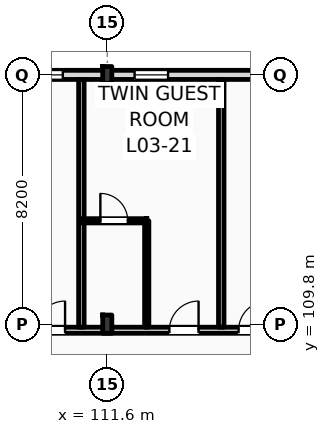
"""IFC4 building model, lengths in metres.
Left out: names, types, materials, properties, quantities, classifications, styles, units other than length and angle.
Written with IfcOpenShell. Run it as: python <this file> out.ifc"""

import sys

from ifc_helpers import new_model, si_unit, direction, frame, frame_2d, origin, origin_2d, place, context, subcontext, project, spatial, rectangle, i_section, extrude, element, fill, save


model = new_model("IFC4")
c1 = context("Model", 3, precision=1e-05, world=origin(), true_north=direction((0.0, 1.0)))
c2 = subcontext(c1, "Body", "Model", "MODEL_VIEW")
j1 = project(units=[si_unit("LENGTHUNIT", "METRE"), si_unit("PLANEANGLEUNIT", "RADIAN")], contexts=[c1])
p1 = place(None, origin())
s1 = spatial("IfcSite", under=j1, at=p1, CompositionType="ELEMENT")
p2 = place(p1, origin())
s2 = spatial("IfcBuilding", under=s1, at=p2, CompositionType="ELEMENT")
p3 = place(p2, frame((0.0, 0.0, 16.2)))
s3 = spatial("IfcBuildingStorey", under=s2, at=p3, CompositionType="ELEMENT", Elevation=16.2)
p4 = place(p3, frame((111.6, 109.8, 0.0), z_axis=(0.0, 0.0, 1.0), x_axis=(1.0, 0.0, 0.0)))
e1 = element("IfcColumn", 1, at=p4, inside=s3, PredefinedType="COLUMN", context=c2, shape_type="SweptSolid", body=[
    extrude(i_section(OverallWidth=0.3, OverallDepth=0.6, WebThickness=0.015, FlangeThickness=0.03, FilletRadius=0.027, at=origin_2d()), origin(), (0.0, 0.0, 1.0), 4.2),
])
p5 = place(p3, frame((111.6, 118.0, 0.0), z_axis=(0.0, 0.0, 1.0), x_axis=(1.0, 0.0, 0.0)))
e2 = element("IfcColumn", 2, at=p5, inside=s3, PredefinedType="COLUMN", context=c2, shape_type="SweptSolid", body=[
    extrude(i_section(OverallWidth=0.3, OverallDepth=0.55, WebThickness=0.015, FlangeThickness=0.029, FilletRadius=0.027, at=origin_2d()), origin(), (0.0, 0.0, 1.0), 4.2),
])
p6 = place(p3, frame((22.5, 118.0, 0.0), z_axis=(0.0, 0.0, 1.0), x_axis=(1.0, 0.0, 0.0)))
e3 = element("IfcWall", 3, at=p6, inside=s3, PredefinedType="STANDARD", context=c2, shape_type="SweptSolid", body=[
    extrude(rectangle(XDim=97.5, YDim=0.3, at=frame_2d((48.75, 0.0))), origin(), (0.0, 0.0, 1.0), 3.36),
])
p7 = place(p6, frame((3.721, 0.0, 0.9)))
e4 = element("IfcOpeningElement", 4, at=p7, cuts=e3, PredefinedType="OPENING", context=c2, shape_type="SweptSolid", body=[
    extrude(rectangle(XDim=0.9, YDim=1.8, at=frame_2d((0.45, 0.9))), frame((0.0, 0.16, 0.0), z_axis=(0.0, -1.0, 0.0), x_axis=(1.0, 0.0, 0.0)), (0.0, 0.0, 1.0), 0.32),
])
p8 = place(p6, frame((6.447, 0.0, 0.9)))
e5 = element("IfcOpeningElement", 5, at=p8, cuts=e3, PredefinedType="OPENING", context=c2, shape_type="SweptSolid", body=[
    extrude(rectangle(XDim=1.35, YDim=1.85, at=frame_2d((0.675, 0.925))), frame((0.0, 0.16, 0.0), z_axis=(0.0, -1.0, 0.0), x_axis=(1.0, 0.0, 0.0)), (0.0, 0.0, 1.0), 0.32),
])
p9 = place(p6, frame((11.363, 0.0, 0.9)))
e6 = element("IfcOpeningElement", 6, at=p9, cuts=e3, PredefinedType="OPENING", context=c2, shape_type="SweptSolid", body=[
    extrude(rectangle(XDim=1.5, YDim=1.9, at=frame_2d((0.75, 0.95))), frame((0.0, 0.16, 0.0), z_axis=(0.0, -1.0, 0.0), x_axis=(1.0, 0.0, 0.0)), (0.0, 0.0, 1.0), 0.32),
])
p10 = place(p6, frame((15.078, 0.0, 0.9)))
e7 = element("IfcOpeningElement", 7, at=p10, cuts=e3, PredefinedType="OPENING", context=c2, shape_type="SweptSolid", body=[
    extrude(rectangle(XDim=1.65, YDim=1.95, at=frame_2d((0.825, 0.975))), frame((0.0, 0.16, 0.0), z_axis=(0.0, -1.0, 0.0), x_axis=(1.0, 0.0, 0.0)), (0.0, 0.0, 1.0), 0.32),
])
p11 = place(p6, frame((19.395, 0.0, 0.9)))
e8 = element("IfcOpeningElement", 8, at=p11, cuts=e3, PredefinedType="OPENING", context=c2, shape_type="SweptSolid", body=[
    extrude(rectangle(XDim=1.8, YDim=2.0, at=frame_2d((0.9, 1.0))), frame((0.0, 0.16, 0.0), z_axis=(0.0, -1.0, 0.0), x_axis=(1.0, 0.0, 0.0)), (0.0, 0.0, 1.0), 0.32),
])
p12 = place(p6, frame((23.31, 0.0, 0.9)))
e9 = element("IfcOpeningElement", 9, at=p12, cuts=e3, PredefinedType="OPENING", context=c2, shape_type="SweptSolid", body=[
    extrude(rectangle(XDim=1.95, YDim=2.05, at=frame_2d((0.975, 1.025))), frame((0.0, 0.16, 0.0), z_axis=(0.0, -1.0, 0.0), x_axis=(1.0, 0.0, 0.0)), (0.0, 0.0, 1.0), 0.32),
])
p13 = place(p6, frame((28.026, 0.0, 0.9)))
e10 = element("IfcOpeningElement", 10, at=p13, cuts=e3, PredefinedType="OPENING", context=c2, shape_type="SweptSolid", body=[
    extrude(rectangle(XDim=2.1, YDim=2.1, at=frame_2d((1.05, 1.05))), frame((0.0, 0.16, 0.0), z_axis=(0.0, -1.0, 0.0), x_axis=(1.0, 0.0, 0.0)), (0.0, 0.0, 1.0), 0.32),
])
p14 = place(p6, frame((31.941, 0.0, 0.9)))
e11 = element("IfcOpeningElement", 11, at=p14, cuts=e3, PredefinedType="OPENING", context=c2, shape_type="SweptSolid", body=[
    extrude(rectangle(XDim=1.1, YDim=2.15, at=frame_2d((0.55, 1.075))), frame((0.0, 0.16, 0.0), z_axis=(0.0, -1.0, 0.0), x_axis=(1.0, 0.0, 0.0)), (0.0, 0.0, 1.0), 0.32),
])
p15 = place(p6, frame((36.657, 0.0, 0.9)))
e12 = element("IfcOpeningElement", 12, at=p15, cuts=e3, PredefinedType="OPENING", context=c2, shape_type="SweptSolid", body=[
    extrude(rectangle(XDim=2.4, YDim=2.2, at=frame_2d((1.2, 1.1))), frame((0.0, 0.16, 0.0), z_axis=(0.0, -1.0, 0.0), x_axis=(1.0, 0.0, 0.0)), (0.0, 0.0, 1.0), 0.32),
])
p16 = place(p6, frame((42.574, 0.0, 0.9)))
e13 = element("IfcOpeningElement", 13, at=p16, cuts=e3, PredefinedType="OPENING", context=c2, shape_type="SweptSolid", body=[
    extrude(rectangle(XDim=1.35, YDim=2.25, at=frame_2d((0.675, 1.125))), frame((0.0, 0.16, 0.0), z_axis=(0.0, -1.0, 0.0), x_axis=(1.0, 0.0, 0.0)), (0.0, 0.0, 1.0), 0.32),
])
p17 = place(p6, frame((45.289, 0.0, 0.9)))
e14 = element("IfcOpeningElement", 14, at=p17, cuts=e3, PredefinedType="OPENING", context=c2, shape_type="SweptSolid", body=[
    extrude(rectangle(XDim=2.7, YDim=2.28, at=frame_2d((1.35, 1.14))), frame((0.0, 0.16, 0.0), z_axis=(0.0, -1.0, 0.0), x_axis=(1.0, 0.0, 0.0)), (0.0, 0.0, 1.0), 0.32),
])
p18 = place(p6, frame((50.406, 0.0, 0.9)))
e15 = element("IfcOpeningElement", 15, at=p18, cuts=e3, PredefinedType="OPENING", context=c2, shape_type="SweptSolid", body=[
    extrude(rectangle(XDim=1.8, YDim=2.28, at=frame_2d((0.9, 1.14))), frame((0.0, 0.16, 0.0), z_axis=(0.0, -1.0, 0.0), x_axis=(1.0, 0.0, 0.0)), (0.0, 0.0, 1.0), 0.32),
])
p19 = place(p6, frame((53.922, 0.0, 0.9)))
e16 = element("IfcOpeningElement", 16, at=p19, cuts=e3, PredefinedType="OPENING", context=c2, shape_type="SweptSolid", body=[
    extrude(rectangle(XDim=1.8, YDim=2.28, at=frame_2d((0.9, 1.14))), frame((0.0, 0.16, 0.0), z_axis=(0.0, -1.0, 0.0), x_axis=(1.0, 0.0, 0.0)), (0.0, 0.0, 1.0), 0.32),
])
p20 = place(p6, frame((58.332, 0.0, 0.9)))
e17 = element("IfcOpeningElement", 17, at=p20, cuts=e3, PredefinedType="OPENING", context=c2, shape_type="SweptSolid", body=[
    extrude(rectangle(XDim=2.961, YDim=2.28, at=frame_2d((1.48, 1.14))), frame((0.0, 0.16, 0.0), z_axis=(0.0, -1.0, 0.0), x_axis=(1.0, 0.0, 0.0)), (0.0, 0.0, 1.0), 0.32),
])
p21 = place(p6, frame((62.513, 0.0, 0.9)))
e18 = element("IfcOpeningElement", 18, at=p21, cuts=e3, PredefinedType="OPENING", context=c2, shape_type="SweptSolid", body=[
    extrude(rectangle(XDim=1.8, YDim=2.28, at=frame_2d((0.9, 1.14))), frame((0.0, 0.16, 0.0), z_axis=(0.0, -1.0, 0.0), x_axis=(1.0, 0.0, 0.0)), (0.0, 0.0, 1.0), 0.32),
])
p22 = place(p6, frame((67.114, 0.0, 0.9)))
e19 = element("IfcOpeningElement", 19, at=p22, cuts=e3, PredefinedType="OPENING", context=c2, shape_type="SweptSolid", body=[
    extrude(rectangle(XDim=2.961, YDim=2.28, at=frame_2d((1.48, 1.14))), frame((0.0, 0.16, 0.0), z_axis=(0.0, -1.0, 0.0), x_axis=(1.0, 0.0, 0.0)), (0.0, 0.0, 1.0), 0.32),
])
p23 = place(p6, frame((73.695, 0.0, 0.9)))
e20 = element("IfcOpeningElement", 20, at=p23, cuts=e3, PredefinedType="OPENING", context=c2, shape_type="SweptSolid", body=[
    extrude(rectangle(XDim=1.1, YDim=2.28, at=frame_2d((0.55, 1.14))), frame((0.0, 0.16, 0.0), z_axis=(0.0, -1.0, 0.0), x_axis=(1.0, 0.0, 0.0)), (0.0, 0.0, 1.0), 0.32),
])
p24 = place(p6, frame((75.895, 0.0, 0.9)))
e21 = element("IfcOpeningElement", 21, at=p24, cuts=e3, PredefinedType="OPENING", context=c2, shape_type="SweptSolid", body=[
    extrude(rectangle(XDim=2.961, YDim=2.28, at=frame_2d((1.48, 1.14))), frame((0.0, 0.16, 0.0), z_axis=(0.0, -1.0, 0.0), x_axis=(1.0, 0.0, 0.0)), (0.0, 0.0, 1.0), 0.32),
])
p25 = place(p6, frame((81.676, 0.0, 0.9)))
e22 = element("IfcOpeningElement", 22, at=p25, cuts=e3, PredefinedType="OPENING", context=c2, shape_type="SweptSolid", body=[
    extrude(rectangle(XDim=1.8, YDim=2.28, at=frame_2d((0.9, 1.14))), frame((0.0, 0.16, 0.0), z_axis=(0.0, -1.0, 0.0), x_axis=(1.0, 0.0, 0.0)), (0.0, 0.0, 1.0), 0.32),
])
p26 = place(p6, frame((84.677, 0.0, 0.9)))
e23 = element("IfcOpeningElement", 23, at=p26, cuts=e3, PredefinedType="OPENING", context=c2, shape_type="SweptSolid", body=[
    extrude(rectangle(XDim=2.961, YDim=2.28, at=frame_2d((1.48, 1.14))), frame((0.0, 0.16, 0.0), z_axis=(0.0, -1.0, 0.0), x_axis=(1.0, 0.0, 0.0)), (0.0, 0.0, 1.0), 0.32),
])
p27 = place(p6, frame((89.999, 0.0, 0.9)))
e24 = element("IfcOpeningElement", 24, at=p27, cuts=e3, PredefinedType="OPENING", context=c2, shape_type="SweptSolid", body=[
    extrude(rectangle(XDim=1.1, YDim=1.5, at=frame_2d((0.55, 0.75))), frame((0.0, 0.16, 0.0), z_axis=(0.0, -1.0, 0.0), x_axis=(1.0, 0.0, 0.0)), (0.0, 0.0, 1.0), 0.32),
])
p28 = place(p6, frame((94.35, 0.0, 0.9)))
e25 = element("IfcOpeningElement", 25, at=p28, cuts=e3, PredefinedType="OPENING", context=c2, shape_type="SweptSolid", body=[
    extrude(rectangle(XDim=1.25, YDim=1.6, at=frame_2d((0.625, 0.8))), frame((0.0, 0.16, 0.0), z_axis=(0.0, -1.0, 0.0), x_axis=(1.0, 0.0, 0.0)), (0.0, 0.0, 1.0), 0.32),
])
p29 = place(p3, frame((10.65, 109.6, 0.0), z_axis=(0.0, 0.0, 1.0), x_axis=(1.0, 0.0, 0.0)))
e26 = element("IfcWall", 26, at=p29, inside=s3, PredefinedType="PARTITIONING", context=c2, shape_type="SweptSolid", body=[
    extrude(rectangle(XDim=109.21, YDim=0.2, at=frame_2d((54.605, 0.0))), origin(), (0.0, 0.0, 1.0), 3.36),
])
p30 = place(p29, frame((15.43, 0.0, 0.0)))
e27 = element("IfcOpeningElement", 27, at=p30, cuts=e26, PredefinedType="OPENING", context=c2, shape_type="SweptSolid", body=[
    extrude(rectangle(XDim=1.02, YDim=2.2, at=frame_2d((0.51, 1.1))), frame((0.0, 0.11, 0.0), z_axis=(0.0, -1.0, 0.0), x_axis=(1.0, 0.0, 0.0)), (0.0, 0.0, 1.0), 0.22),
])
p31 = place(p29, frame((19.537, 0.0, 0.0)))
e28 = element("IfcOpeningElement", 28, at=p31, cuts=e26, PredefinedType="OPENING", context=c2, shape_type="SweptSolid", body=[
    extrude(rectangle(XDim=1.02, YDim=2.2, at=frame_2d((0.51, 1.1))), frame((0.0, 0.11, 0.0), z_axis=(0.0, -1.0, 0.0), x_axis=(1.0, 0.0, 0.0)), (0.0, 0.0, 1.0), 0.22),
])
p32 = place(p29, frame((23.928, 0.0, 0.0)))
e29 = element("IfcOpeningElement", 29, at=p32, cuts=e26, PredefinedType="OPENING", context=c2, shape_type="SweptSolid", body=[
    extrude(rectangle(XDim=1.02, YDim=2.2, at=frame_2d((0.51, 1.1))), frame((0.0, 0.11, 0.0), z_axis=(0.0, -1.0, 0.0), x_axis=(1.0, 0.0, 0.0)), (0.0, 0.0, 1.0), 0.22),
])
p33 = place(p29, frame((26.169, 0.0, 0.0)))
e30 = element("IfcOpeningElement", 30, at=p33, cuts=e26, PredefinedType="OPENING", context=c2, shape_type="SweptSolid", body=[
    extrude(rectangle(XDim=1.02, YDim=2.2, at=frame_2d((0.51, 1.1))), frame((0.0, 0.11, 0.0), z_axis=(0.0, -1.0, 0.0), x_axis=(1.0, 0.0, 0.0)), (0.0, 0.0, 1.0), 0.22),
])
p34 = place(p29, frame((32.739, 0.0, 0.0)))
e31 = element("IfcOpeningElement", 31, at=p34, cuts=e26, PredefinedType="OPENING", context=c2, shape_type="SweptSolid", body=[
    extrude(rectangle(XDim=0.96, YDim=2.2, at=frame_2d((0.48, 1.1))), frame((0.0, 0.11, 0.0), z_axis=(0.0, -1.0, 0.0), x_axis=(1.0, 0.0, 0.0)), (0.0, 0.0, 1.0), 0.22),
])
p35 = place(p29, frame((34.98, 0.0, 0.0)))
e32 = element("IfcOpeningElement", 32, at=p35, cuts=e26, PredefinedType="OPENING", context=c2, shape_type="SweptSolid", body=[
    extrude(rectangle(XDim=0.96, YDim=2.2, at=frame_2d((0.48, 1.1))), frame((0.0, 0.11, 0.0), z_axis=(0.0, -1.0, 0.0), x_axis=(1.0, 0.0, 0.0)), (0.0, 0.0, 1.0), 0.22),
])
p36 = place(p29, frame((41.521, 0.0, 0.0)))
e33 = element("IfcOpeningElement", 33, at=p36, cuts=e26, PredefinedType="OPENING", context=c2, shape_type="SweptSolid", body=[
    extrude(rectangle(XDim=0.96, YDim=2.2, at=frame_2d((0.48, 1.1))), frame((0.0, 0.11, 0.0), z_axis=(0.0, -1.0, 0.0), x_axis=(1.0, 0.0, 0.0)), (0.0, 0.0, 1.0), 0.22),
])
p37 = place(p29, frame((43.512, 0.0, 0.0)))
e34 = element("IfcOpeningElement", 34, at=p37, cuts=e26, PredefinedType="OPENING", context=c2, shape_type="SweptSolid", body=[
    extrude(rectangle(XDim=0.96, YDim=2.2, at=frame_2d((0.48, 1.1))), frame((0.0, 0.11, 0.0), z_axis=(0.0, -1.0, 0.0), x_axis=(1.0, 0.0, 0.0)), (0.0, 0.0, 1.0), 0.22),
])
p38 = place(p29, frame((50.303, 0.0, 0.0)))
e35 = element("IfcOpeningElement", 35, at=p38, cuts=e26, PredefinedType="OPENING", context=c2, shape_type="SweptSolid", body=[
    extrude(rectangle(XDim=0.96, YDim=2.2, at=frame_2d((0.48, 1.1))), frame((0.0, 0.11, 0.0), z_axis=(0.0, -1.0, 0.0), x_axis=(1.0, 0.0, 0.0)), (0.0, 0.0, 1.0), 0.22),
])
p39 = place(p29, frame((54.944, 0.0, 0.0)))
e36 = element("IfcOpeningElement", 36, at=p39, cuts=e26, PredefinedType="OPENING", context=c2, shape_type="SweptSolid", body=[
    extrude(rectangle(XDim=0.96, YDim=2.2, at=frame_2d((0.48, 1.1))), frame((0.0, 0.11, 0.0), z_axis=(0.0, -1.0, 0.0), x_axis=(1.0, 0.0, 0.0)), (0.0, 0.0, 1.0), 0.22),
])
p40 = place(p29, frame((59.085, 0.0, 0.0)))
e37 = element("IfcOpeningElement", 37, at=p40, cuts=e26, PredefinedType="OPENING", context=c2, shape_type="SweptSolid", body=[
    extrude(rectangle(XDim=0.96, YDim=2.2, at=frame_2d((0.48, 1.1))), frame((0.0, 0.11, 0.0), z_axis=(0.0, -1.0, 0.0), x_axis=(1.0, 0.0, 0.0)), (0.0, 0.0, 1.0), 0.22),
])
p41 = place(p29, frame((63.476, 0.0, 0.0)))
e38 = element("IfcOpeningElement", 38, at=p41, cuts=e26, PredefinedType="OPENING", context=c2, shape_type="SweptSolid", body=[
    extrude(rectangle(XDim=0.96, YDim=2.2, at=frame_2d((0.48, 1.1))), frame((0.0, 0.11, 0.0), z_axis=(0.0, -1.0, 0.0), x_axis=(1.0, 0.0, 0.0)), (0.0, 0.0, 1.0), 0.22),
])
p42 = place(p29, frame((65.716, 0.0, 0.0)))
e39 = element("IfcOpeningElement", 39, at=p42, cuts=e26, PredefinedType="OPENING", context=c2, shape_type="SweptSolid", body=[
    extrude(rectangle(XDim=0.96, YDim=2.2, at=frame_2d((0.48, 1.1))), frame((0.0, 0.11, 0.0), z_axis=(0.0, -1.0, 0.0), x_axis=(1.0, 0.0, 0.0)), (0.0, 0.0, 1.0), 0.22),
])
p43 = place(p29, frame((72.257, 0.0, 0.0)))
e40 = element("IfcOpeningElement", 40, at=p43, cuts=e26, PredefinedType="OPENING", context=c2, shape_type="SweptSolid", body=[
    extrude(rectangle(XDim=0.96, YDim=2.2, at=frame_2d((0.48, 1.1))), frame((0.0, 0.11, 0.0), z_axis=(0.0, -1.0, 0.0), x_axis=(1.0, 0.0, 0.0)), (0.0, 0.0, 1.0), 0.22),
])
p44 = place(p29, frame((74.498, 0.0, 0.0)))
e41 = element("IfcOpeningElement", 41, at=p44, cuts=e26, PredefinedType="OPENING", context=c2, shape_type="SweptSolid", body=[
    extrude(rectangle(XDim=0.96, YDim=2.2, at=frame_2d((0.48, 1.1))), frame((0.0, 0.11, 0.0), z_axis=(0.0, -1.0, 0.0), x_axis=(1.0, 0.0, 0.0)), (0.0, 0.0, 1.0), 0.22),
])
p45 = place(p29, frame((81.039, 0.0, 0.0)))
e42 = element("IfcOpeningElement", 42, at=p45, cuts=e26, PredefinedType="OPENING", context=c2, shape_type="SweptSolid", body=[
    extrude(rectangle(XDim=0.96, YDim=2.2, at=frame_2d((0.48, 1.1))), frame((0.0, 0.11, 0.0), z_axis=(0.0, -1.0, 0.0), x_axis=(1.0, 0.0, 0.0)), (0.0, 0.0, 1.0), 0.22),
])
p46 = place(p29, frame((85.68, 0.0, 0.0)))
e43 = element("IfcOpeningElement", 43, at=p46, cuts=e26, PredefinedType="OPENING", context=c2, shape_type="SweptSolid", body=[
    extrude(rectangle(XDim=0.96, YDim=2.2, at=frame_2d((0.48, 1.1))), frame((0.0, 0.11, 0.0), z_axis=(0.0, -1.0, 0.0), x_axis=(1.0, 0.0, 0.0)), (0.0, 0.0, 1.0), 0.22),
])
p47 = place(p29, frame((89.82, 0.0, 0.0)))
e44 = element("IfcOpeningElement", 44, at=p47, cuts=e26, PredefinedType="OPENING", context=c2, shape_type="SweptSolid", body=[
    extrude(rectangle(XDim=0.96, YDim=2.2, at=frame_2d((0.48, 1.1))), frame((0.0, 0.11, 0.0), z_axis=(0.0, -1.0, 0.0), x_axis=(1.0, 0.0, 0.0)), (0.0, 0.0, 1.0), 0.22),
])
p48 = place(p29, frame((94.211, 0.0, 0.0)))
e45 = element("IfcOpeningElement", 45, at=p48, cuts=e26, PredefinedType="OPENING", context=c2, shape_type="SweptSolid", body=[
    extrude(rectangle(XDim=0.96, YDim=2.2, at=frame_2d((0.48, 1.1))), frame((0.0, 0.11, 0.0), z_axis=(0.0, -1.0, 0.0), x_axis=(1.0, 0.0, 0.0)), (0.0, 0.0, 1.0), 0.22),
])
p49 = place(p29, frame((98.602, 0.0, 0.0)))
e46 = element("IfcOpeningElement", 46, at=p49, cuts=e26, PredefinedType="OPENING", context=c2, shape_type="SweptSolid", body=[
    extrude(rectangle(XDim=0.96, YDim=2.2, at=frame_2d((0.48, 1.1))), frame((0.0, 0.11, 0.0), z_axis=(0.0, -1.0, 0.0), x_axis=(1.0, 0.0, 0.0)), (0.0, 0.0, 1.0), 0.22),
])
p50 = place(p29, frame((102.993, 0.0, 0.0)))
e47 = element("IfcOpeningElement", 47, at=p50, cuts=e26, PredefinedType="OPENING", context=c2, shape_type="SweptSolid", body=[
    extrude(rectangle(XDim=0.96, YDim=2.2, at=frame_2d((0.48, 1.1))), frame((0.0, 0.11, 0.0), z_axis=(0.0, -1.0, 0.0), x_axis=(1.0, 0.0, 0.0)), (0.0, 0.0, 1.0), 0.22),
])
p51 = place(p29, frame((105.269, 0.0, 0.0)))
e48 = element("IfcOpeningElement", 48, at=p51, cuts=e26, PredefinedType="OPENING", context=c2, shape_type="SweptSolid", body=[
    extrude(rectangle(XDim=0.96, YDim=2.2, at=frame_2d((0.48, 1.1))), frame((0.0, 0.11, 0.0), z_axis=(0.0, -1.0, 0.0), x_axis=(1.0, 0.0, 0.0)), (0.0, 0.0, 1.0), 0.22),
])
p52 = place(p29, frame((2.716, 0.0, 0.0)))
e49 = element("IfcOpeningElement", 49, at=p52, cuts=e26, PredefinedType="OPENING", context=c2, shape_type="SweptSolid", body=[
    extrude(rectangle(XDim=1.35, YDim=2.25, at=frame_2d((0.675, 1.125))), frame((0.0, 0.11, 0.0), z_axis=(0.0, -1.0, 0.0), x_axis=(1.0, 0.0, 0.0)), (0.0, 0.0, 1.0), 0.22),
])
p53 = place(p29, frame((6.65, 0.0, 0.0)))
e50 = element("IfcOpeningElement", 50, at=p53, cuts=e26, PredefinedType="OPENING", context=c2, shape_type="SweptSolid", body=[
    extrude(rectangle(XDim=1.35, YDim=2.25, at=frame_2d((0.675, 1.125))), frame((0.0, 0.11, 0.0), z_axis=(0.0, -1.0, 0.0), x_axis=(1.0, 0.0, 0.0)), (0.0, 0.0, 1.0), 0.22),
])
p54 = place(p29, frame((10.583, 0.0, 0.0)))
e51 = element("IfcOpeningElement", 51, at=p54, cuts=e26, PredefinedType="OPENING", context=c2, shape_type="SweptSolid", body=[
    extrude(rectangle(XDim=1.35, YDim=2.25, at=frame_2d((0.675, 1.125))), frame((0.0, 0.11, 0.0), z_axis=(0.0, -1.0, 0.0), x_axis=(1.0, 0.0, 0.0)), (0.0, 0.0, 1.0), 0.22),
])
for number, where, z_axis, x_axis in (
    (52, (110.748, 109.7, 0.0), (0.0, 0.0, 1.0), (0.0, 1.0, 0.0)),
    (53, (115.349, 109.7, 0.0), (0.0, 0.0, 1.0), (0.0, 1.0, 0.0)),
):
    element("IfcWall", number, at=place(p3, frame(where, z_axis=z_axis, x_axis=x_axis)), inside=s3, PredefinedType="PARTITIONING", context=c2, shape_type="SweptSolid", body=[
        extrude(rectangle(XDim=8.15, YDim=0.18, at=frame_2d((4.075, 0.0))), origin(), (0.0, 0.0, 1.0), 3.92),
    ])
p55 = place(p3, frame((112.898, 109.7, 0.0), z_axis=(0.0, 0.0, 1.0), x_axis=(0.0, 1.0, 0.0)))
e54 = element("IfcWall", 54, at=p55, inside=s3, PredefinedType="PARTITIONING", context=c2, shape_type="SweptSolid", body=[
    extrude(rectangle(XDim=3.5, YDim=0.14, at=frame_2d((1.75, 0.0))), origin(), (0.0, 0.0, 1.0), 3.92),
])
p56 = place(p3, frame((110.748, 113.2, 0.0), z_axis=(0.0, 0.0, 1.0), x_axis=(1.0, 0.0, 0.0)))
e55 = element("IfcWall", 55, at=p56, inside=s3, PredefinedType="PARTITIONING", context=c2, shape_type="SweptSolid", body=[
    extrude(rectangle(XDim=2.15, YDim=0.14, at=frame_2d((1.075, 0.0))), origin(), (0.0, 0.0, 1.0), 3.92),
])
p57 = place(p56, frame((0.625, 0.0, 0.0)))
e56 = element("IfcOpeningElement", 56, at=p57, cuts=e55, PredefinedType="OPENING", context=c2, shape_type="SweptSolid", body=[
    extrude(rectangle(XDim=0.9, YDim=2.1, at=frame_2d((0.45, 1.05))), frame((0.0, 0.08, 0.0), z_axis=(0.0, -1.0, 0.0), x_axis=(1.0, 0.0, 0.0)), (0.0, 0.0, 1.0), 0.16),
])
p58 = place(p26, origin())
e57 = element("IfcWindow", 57, at=p58, inside=s3, PartitioningType="DOUBLE_PANEL_VERTICAL", PredefinedType="WINDOW", context=c2, shape_type="SweptSolid", body=[
    extrude(rectangle(XDim=2.961, YDim=2.28, at=frame_2d((1.48, 1.14))), frame((0.0, 0.03, 0.0), z_axis=(0.0, -1.0, 0.0), x_axis=(1.0, 0.0, 0.0)), (0.0, 0.0, 1.0), 0.06),
])
fill(e23, e57)
p59 = place(p27, origin())
e58 = element("IfcWindow", 58, at=p59, inside=s3, PartitioningType="DOUBLE_PANEL_VERTICAL", PredefinedType="WINDOW", context=c2, shape_type="SweptSolid", body=[
    extrude(rectangle(XDim=1.1, YDim=1.5, at=frame_2d((0.55, 0.75))), frame((0.0, 0.03, 0.0), z_axis=(0.0, -1.0, 0.0), x_axis=(1.0, 0.0, 0.0)), (0.0, 0.0, 1.0), 0.06),
])
fill(e24, e58)
p60 = place(p49, origin())
e59 = element("IfcDoor", 59, at=p60, inside=s3, OperationType="SINGLE_SWING_RIGHT", PredefinedType="DOOR", context=c2, shape_type="SweptSolid", body=[
    extrude(rectangle(XDim=0.96, YDim=2.2, at=frame_2d((0.48, 1.1))), frame((0.0, 0.025, 0.0), z_axis=(0.0, -1.0, 0.0), x_axis=(1.0, 0.0, 0.0)), (0.0, 0.0, 1.0), 0.05),
])
fill(e46, e59)
p61 = place(p50, origin())
e60 = element("IfcDoor", 60, at=p61, inside=s3, OperationType="SINGLE_SWING_RIGHT", PredefinedType="DOOR", context=c2, shape_type="SweptSolid", body=[
    extrude(rectangle(XDim=0.96, YDim=2.2, at=frame_2d((0.48, 1.1))), frame((0.0, 0.025, 0.0), z_axis=(0.0, -1.0, 0.0), x_axis=(1.0, 0.0, 0.0)), (0.0, 0.0, 1.0), 0.05),
])
fill(e47, e60)
p62 = place(p57, origin())
e61 = element("IfcDoor", 61, at=p62, inside=s3, OperationType="SINGLE_SWING_LEFT", PredefinedType="DOOR", context=c2, shape_type="SweptSolid", body=[
    extrude(rectangle(XDim=0.9, YDim=2.1, at=frame_2d((0.45, 1.05))), frame((0.0, 0.025, 0.0), z_axis=(0.0, -1.0, 0.0), x_axis=(1.0, 0.0, 0.0)), (0.0, 0.0, 1.0), 0.05),
])
fill(e56, e61)
p63 = place(p51, origin())
e62 = element("IfcDoor", 62, at=p63, inside=s3, OperationType="SINGLE_SWING_RIGHT", PredefinedType="DOOR", context=c2, shape_type="SweptSolid", body=[
    extrude(rectangle(XDim=0.96, YDim=2.2, at=frame_2d((0.48, 1.1))), frame((0.0, 0.025, 0.0), z_axis=(0.0, -1.0, 0.0), x_axis=(1.0, 0.0, 0.0)), (0.0, 0.0, 1.0), 0.05),
])
fill(e48, e62)
save(model, sys.argv[1])
